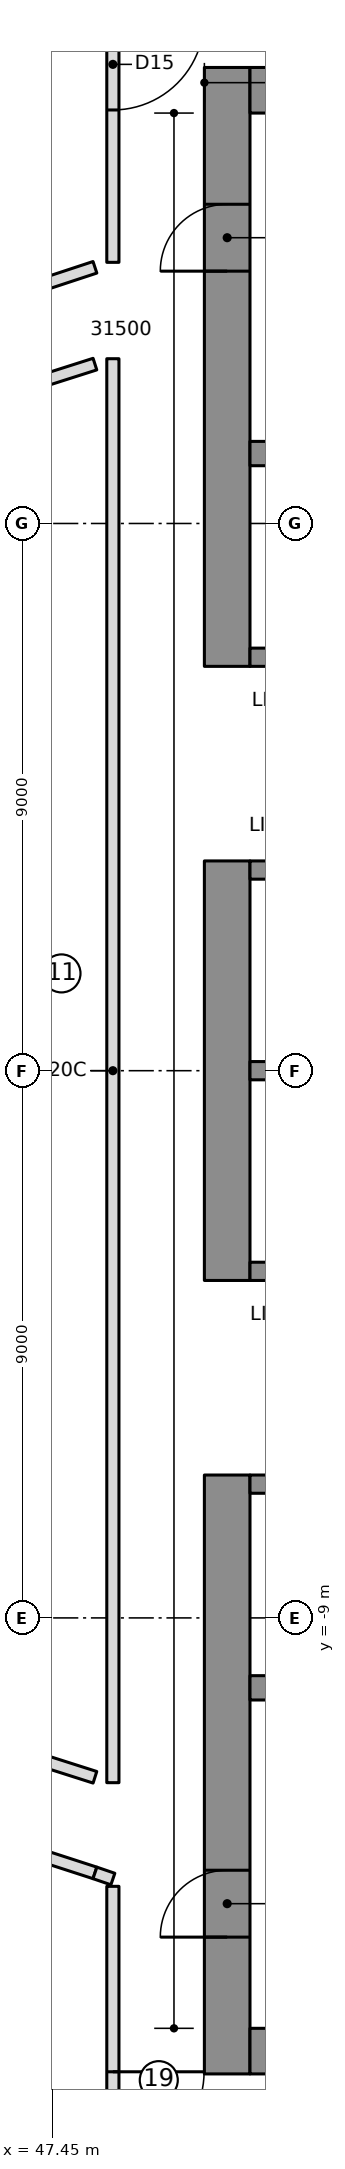
"""IFC4 building model, lengths in metres.
Left out: names, types, materials, properties, quantities, classifications, styles, units other than length and angle.
Written with IfcOpenShell. Run it as: python <this file> out.ifc"""

import sys

from ifc_helpers import new_model, si_unit, direction, frame, frame_2d, origin, place, context, subcontext, project, spatial, rectangle, extrude, element, fill, save


model = new_model("IFC4")
c1 = context("Model", 3, precision=1e-05, world=origin(), true_north=direction((0.0, 1.0)))
c2 = subcontext(c1, "Body", "Model", "MODEL_VIEW")
j1 = project(units=[si_unit("LENGTHUNIT", "METRE"), si_unit("PLANEANGLEUNIT", "RADIAN")], contexts=[c1])
p1 = place(None, origin())
s1 = spatial("IfcSite", under=j1, at=p1, CompositionType="ELEMENT")
p2 = place(p1, origin())
s2 = spatial("IfcBuilding", under=s1, at=p2, CompositionType="ELEMENT")
p3 = place(p2, frame((0.0, 0.0, 186.15)))
s3 = spatial("IfcBuildingStorey", under=s2, at=p3, CompositionType="ELEMENT", Elevation=186.15)
p4 = place(p3, frame((50.325, 6.65, 0.0), z_axis=(0.0, 0.0, 1.0), x_axis=(0.0, 1.0, 0.0)))
e1 = element("IfcWall", 1, at=p4, inside=s3, PredefinedType="SHEAR", context=c2, shape_type="SweptSolid", body=[
    extrude(rectangle(XDim=9.85, YDim=0.75, at=frame_2d((4.925, 0.0))), origin(), (0.0, 0.0, 1.0), 3.55),
])
p5 = place(p4, frame((6.5, 0.0, 0.0)))
e2 = element("IfcOpeningElement", 2, at=p5, cuts=e1, PredefinedType="OPENING", context=c2, shape_type="SweptSolid", body=[
    extrude(rectangle(XDim=1.1, YDim=2.1, at=frame_2d((0.55, 1.05))), frame((0.0, 0.385, 0.0), z_axis=(0.0, -1.0, 0.0), x_axis=(1.0, 0.0, 0.0)), (0.0, 0.0, 1.0), 0.77),
])
p6 = place(p3, frame((50.325, -3.45, 0.0), z_axis=(0.0, 0.0, 1.0), x_axis=(0.0, 1.0, 0.0)))
e3 = element("IfcWall", 3, at=p6, inside=s3, PredefinedType="SHEAR", context=c2, shape_type="SweptSolid", body=[
    extrude(rectangle(XDim=6.9, YDim=0.75, at=frame_2d((3.45, 0.0))), origin(), (0.0, 0.0, 1.0), 3.55),
])
p7 = place(p3, frame((50.325, -16.5, 0.0), z_axis=(0.0, 0.0, 1.0), x_axis=(0.0, 1.0, 0.0)))
e4 = element("IfcWall", 4, at=p7, inside=s3, PredefinedType="SHEAR", context=c2, shape_type="SweptSolid", body=[
    extrude(rectangle(XDim=9.85, YDim=0.75, at=frame_2d((4.925, 0.0))), origin(), (0.0, 0.0, 1.0), 3.55),
])
p8 = place(p7, frame((2.25, 0.0, 0.0)))
e5 = element("IfcOpeningElement", 5, at=p8, cuts=e4, PredefinedType="OPENING", context=c2, shape_type="SweptSolid", body=[
    extrude(rectangle(XDim=1.1, YDim=2.1, at=frame_2d((0.55, 1.05))), frame((0.0, 0.385, 0.0), z_axis=(0.0, -1.0, 0.0), x_axis=(1.0, 0.0, 0.0)), (0.0, 0.0, 1.0), 0.77),
])
for number, where, z_axis, x_axis in (
    (6, (50.7, 16.125, 0.0), (0.0, 0.0, 1.0), (1.0, 0.0, 0.0)),
    (7, (50.7, -16.125, 0.0), (0.0, 0.0, 1.0), (1.0, 0.0, 0.0)),
):
    element("IfcWall", number, at=place(p3, frame(where, z_axis=z_axis, x_axis=x_axis)), inside=s3, PredefinedType="SHEAR", context=c2, shape_type="SweptSolid", body=[
        extrude(rectangle(XDim=13.77, YDim=0.75, at=frame_2d((6.885, 0.0))), origin(), (0.0, 0.0, 1.0), 3.55),
    ])
p9 = place(p3, frame((50.7, 10.15, 0.0), z_axis=(0.0, 0.0, 1.0), x_axis=(1.0, 0.0, 0.0)))
e8 = element("IfcWall", 8, at=p9, inside=s3, PredefinedType="SHEAR", context=c2, shape_type="SweptSolid", body=[
    extrude(rectangle(XDim=13.02, YDim=0.4, at=frame_2d((6.51, 0.0))), origin(), (0.0, 0.0, 1.0), 3.55),
])
p10 = place(p9, frame((0.7, 0.0, 0.0)))
e9 = element("IfcOpeningElement", 9, at=p10, cuts=e8, PredefinedType="OPENING", context=c2, shape_type="SweptSolid", body=[
    extrude(rectangle(XDim=1.1, YDim=2.1, at=frame_2d((0.55, 1.05))), frame((0.0, 0.21, 0.0), z_axis=(0.0, -1.0, 0.0), x_axis=(1.0, 0.0, 0.0)), (0.0, 0.0, 1.0), 0.42),
])
p11 = place(p9, frame((3.5, 0.0, 0.0)))
e10 = element("IfcOpeningElement", 10, at=p11, cuts=e8, PredefinedType="OPENING", context=c2, shape_type="SweptSolid", body=[
    extrude(rectangle(XDim=1.1, YDim=2.1, at=frame_2d((0.55, 1.05))), frame((0.0, 0.21, 0.0), z_axis=(0.0, -1.0, 0.0), x_axis=(1.0, 0.0, 0.0)), (0.0, 0.0, 1.0), 0.42),
])
p12 = place(p3, frame((50.7, -10.15, 0.0), z_axis=(0.0, 0.0, 1.0), x_axis=(1.0, 0.0, 0.0)))
e11 = element("IfcWall", 11, at=p12, inside=s3, PredefinedType="SHEAR", context=c2, shape_type="SweptSolid", body=[
    extrude(rectangle(XDim=13.02, YDim=0.4, at=frame_2d((6.51, 0.0))), origin(), (0.0, 0.0, 1.0), 3.55),
])
p13 = place(p3, frame((50.7, 0.0, 0.0), z_axis=(0.0, 0.0, 1.0), x_axis=(1.0, 0.0, 0.0)))
e12 = element("IfcWall", 12, at=p13, inside=s3, PredefinedType="SHEAR", context=c2, shape_type="SweptSolid", body=[
    extrude(rectangle(XDim=10.9, YDim=0.3, at=frame_2d((5.45, 0.0))), origin(), (0.0, 0.0, 1.0), 3.55),
])
p14 = place(p3, frame((50.7, 3.3, 0.0), z_axis=(0.0, 0.0, 1.0), x_axis=(1.0, 0.0, 0.0)))
e13 = element("IfcWall", 13, at=p14, inside=s3, PredefinedType="SHEAR", context=c2, shape_type="SweptSolid", body=[
    extrude(rectangle(XDim=10.9, YDim=0.3, at=frame_2d((5.45, 0.0))), origin(), (0.0, 0.0, 1.0), 3.55),
])
p15 = place(p14, frame((0.7, 0.0, 0.0)))
e14 = element("IfcOpeningElement", 14, at=p15, cuts=e13, PredefinedType="OPENING", context=c2, shape_type="SweptSolid", body=[
    extrude(rectangle(XDim=1.1, YDim=2.1, at=frame_2d((0.55, 1.05))), frame((0.0, 0.16, 0.0), z_axis=(0.0, -1.0, 0.0), x_axis=(1.0, 0.0, 0.0)), (0.0, 0.0, 1.0), 0.32),
])
p16 = place(p14, frame((3.5, 0.0, 0.0)))
e15 = element("IfcOpeningElement", 15, at=p16, cuts=e13, PredefinedType="OPENING", context=c2, shape_type="SweptSolid", body=[
    extrude(rectangle(XDim=1.1, YDim=2.1, at=frame_2d((0.55, 1.05))), frame((0.0, 0.16, 0.0), z_axis=(0.0, -1.0, 0.0), x_axis=(1.0, 0.0, 0.0)), (0.0, 0.0, 1.0), 0.32),
])
p17 = place(p14, frame((6.3, 0.0, 0.0)))
e16 = element("IfcOpeningElement", 16, at=p17, cuts=e13, PredefinedType="OPENING", context=c2, shape_type="SweptSolid", body=[
    extrude(rectangle(XDim=1.1, YDim=2.1, at=frame_2d((0.55, 1.05))), frame((0.0, 0.16, 0.0), z_axis=(0.0, -1.0, 0.0), x_axis=(1.0, 0.0, 0.0)), (0.0, 0.0, 1.0), 0.32),
])
p18 = place(p14, frame((9.1, 0.0, 0.0)))
e17 = element("IfcOpeningElement", 17, at=p18, cuts=e13, PredefinedType="OPENING", context=c2, shape_type="SweptSolid", body=[
    extrude(rectangle(XDim=1.1, YDim=2.1, at=frame_2d((0.55, 1.05))), frame((0.0, 0.16, 0.0), z_axis=(0.0, -1.0, 0.0), x_axis=(1.0, 0.0, 0.0)), (0.0, 0.0, 1.0), 0.32),
])
p19 = place(p3, frame((50.7, 6.8, 0.0), z_axis=(0.0, 0.0, 1.0), x_axis=(1.0, 0.0, 0.0)))
e18 = element("IfcWall", 18, at=p19, inside=s3, PredefinedType="SHEAR", context=c2, shape_type="SweptSolid", body=[
    extrude(rectangle(XDim=10.9, YDim=0.3, at=frame_2d((5.45, 0.0))), origin(), (0.0, 0.0, 1.0), 3.55),
])
p20 = place(p19, frame((6.4, 0.0, 0.0)))
e19 = element("IfcOpeningElement", 19, at=p20, cuts=e18, PredefinedType="OPENING", context=c2, shape_type="SweptSolid", body=[
    extrude(rectangle(XDim=0.9, YDim=2.1, at=frame_2d((0.45, 1.05))), frame((0.0, 0.16, 0.0), z_axis=(0.0, -1.0, 0.0), x_axis=(1.0, 0.0, 0.0)), (0.0, 0.0, 1.0), 0.32),
])
p21 = place(p19, frame((9.2, 0.0, 0.0)))
e20 = element("IfcOpeningElement", 20, at=p21, cuts=e18, PredefinedType="OPENING", context=c2, shape_type="SweptSolid", body=[
    extrude(rectangle(XDim=0.9, YDim=2.1, at=frame_2d((0.45, 1.05))), frame((0.0, 0.16, 0.0), z_axis=(0.0, -1.0, 0.0), x_axis=(1.0, 0.0, 0.0)), (0.0, 0.0, 1.0), 0.32),
])
p22 = place(p3, frame((50.7, -3.3, 0.0), z_axis=(0.0, 0.0, 1.0), x_axis=(1.0, 0.0, 0.0)))
e21 = element("IfcWall", 21, at=p22, inside=s3, PredefinedType="SHEAR", context=c2, shape_type="SweptSolid", body=[
    extrude(rectangle(XDim=10.9, YDim=0.3, at=frame_2d((5.45, 0.0))), origin(), (0.0, 0.0, 1.0), 3.55),
])
p23 = place(p22, frame((9.1, 0.0, 0.0)))
e22 = element("IfcOpeningElement", 22, at=p23, cuts=e21, PredefinedType="OPENING", context=c2, shape_type="SweptSolid", body=[
    extrude(rectangle(XDim=1.1, YDim=2.1, at=frame_2d((0.55, 1.05))), frame((0.0, 0.16, 0.0), z_axis=(0.0, -1.0, 0.0), x_axis=(1.0, 0.0, 0.0)), (0.0, 0.0, 1.0), 0.32),
])
p24 = place(p3, frame((50.7, -6.8, 0.0), z_axis=(0.0, 0.0, 1.0), x_axis=(1.0, 0.0, 0.0)))
e23 = element("IfcWall", 23, at=p24, inside=s3, PredefinedType="SHEAR", context=c2, shape_type="SweptSolid", body=[
    extrude(rectangle(XDim=10.9, YDim=0.3, at=frame_2d((5.45, 0.0))), origin(), (0.0, 0.0, 1.0), 3.55),
])
p25 = place(p24, frame((6.3, 0.0, 0.0)))
e24 = element("IfcOpeningElement", 24, at=p25, cuts=e23, PredefinedType="OPENING", context=c2, shape_type="SweptSolid", body=[
    extrude(rectangle(XDim=1.1, YDim=2.1, at=frame_2d((0.55, 1.05))), frame((0.0, 0.16, 0.0), z_axis=(0.0, -1.0, 0.0), x_axis=(1.0, 0.0, 0.0)), (0.0, 0.0, 1.0), 0.32),
])
p26 = place(p24, frame((9.1, 0.0, 0.0)))
e25 = element("IfcOpeningElement", 25, at=p26, cuts=e23, PredefinedType="OPENING", context=c2, shape_type="SweptSolid", body=[
    extrude(rectangle(XDim=1.1, YDim=2.1, at=frame_2d((0.55, 1.05))), frame((0.0, 0.16, 0.0), z_axis=(0.0, -1.0, 0.0), x_axis=(1.0, 0.0, 0.0)), (0.0, 0.0, 1.0), 0.32),
])
p27 = place(p24, frame((0.8, 0.0, 0.0)))
e26 = element("IfcOpeningElement", 26, at=p27, cuts=e23, PredefinedType="OPENING", context=c2, shape_type="SweptSolid", body=[
    extrude(rectangle(XDim=0.9, YDim=2.1, at=frame_2d((0.45, 1.05))), frame((0.0, 0.16, 0.0), z_axis=(0.0, -1.0, 0.0), x_axis=(1.0, 0.0, 0.0)), (0.0, 0.0, 1.0), 0.32),
])
p28 = place(p24, frame((3.6, 0.0, 0.0)))
e27 = element("IfcOpeningElement", 27, at=p28, cuts=e23, PredefinedType="OPENING", context=c2, shape_type="SweptSolid", body=[
    extrude(rectangle(XDim=0.9, YDim=2.1, at=frame_2d((0.45, 1.05))), frame((0.0, 0.16, 0.0), z_axis=(0.0, -1.0, 0.0), x_axis=(1.0, 0.0, 0.0)), (0.0, 0.0, 1.0), 0.32),
])
p29 = place(p3, frame((48.15, 13.213, 0.0), z_axis=(0.0, 0.0, 1.0), x_axis=(-0.949729856115, -0.313070599711, 0.0)))
e28 = element("IfcWall", 28, at=p29, inside=s3, PredefinedType="PARTITIONING", context=c2, shape_type="SweptSolid", body=[
    extrude(rectangle(XDim=3.853, YDim=0.2, at=frame_2d((1.927, 0.0))), origin(), (0.0, 0.0, 1.0), 3.25),
])
p30 = place(p3, frame((44.49, -12.007, 0.0), z_axis=(0.0, 0.0, 1.0), x_axis=(0.951228355446, -0.308487626648, 0.0)))
e29 = element("IfcWall", 29, at=p30, inside=s3, PredefinedType="PARTITIONING", context=c2, shape_type="SweptSolid", body=[
    extrude(rectangle(XDim=3.847, YDim=0.2, at=frame_2d((1.924, 0.0))), origin(), (0.0, 0.0, 1.0), 3.25),
])
for number, where, z_axis, x_axis in (
    (30, (46.881, 11.217, 0.0), (0.0, 0.0, 1.0), (0.953, 0.304, 0.0)),
    (31, (48.15, -11.621, 0.0), (0.0, 0.0, 1.0), (-0.953, 0.304, 0.0)),
):
    element("IfcWall", number, at=place(p3, frame(where, z_axis=z_axis, x_axis=x_axis)), inside=s3, PredefinedType="PARTITIONING", context=c2, shape_type="SweptSolid", body=[
        extrude(rectangle(XDim=1.332, YDim=0.2, at=frame_2d((0.666, 0.0))), origin(), (0.0, 0.0, 1.0), 3.25),
    ])
p31 = place(p3, frame((48.445, 11.71, 0.0), z_axis=(0.0, 0.0, 1.0), x_axis=(0.0, -1.0, 0.0)))
e32 = element("IfcWall", 32, at=p31, inside=s3, PredefinedType="PARTITIONING", context=c2, shape_type="SweptSolid", body=[
    extrude(rectangle(XDim=23.42, YDim=0.2, at=frame_2d((11.71, 0.0))), origin(), (0.0, 0.0, 1.0), 3.25),
])
p32 = place(p3, frame((48.445, 20.351, 0.0), z_axis=(0.0, 0.0, 1.0), x_axis=(0.0, -1.0, 0.0)))
e33 = element("IfcWall", 33, at=p32, inside=s3, PredefinedType="PARTITIONING", context=c2, shape_type="SweptSolid", body=[
    extrude(rectangle(XDim=7.056, YDim=0.2, at=frame_2d((3.528, 0.0))), origin(), (0.0, 0.0, 1.0), 3.25),
])
p33 = place(p32, frame((3.05, 0.0, 0.0)))
e34 = element("IfcOpeningElement", 34, at=p33, cuts=e33, PredefinedType="OPENING", context=c2, shape_type="SweptSolid", body=[
    extrude(rectangle(XDim=1.5, YDim=2.1, at=frame_2d((0.75, 1.05))), frame((0.0, 0.11, 0.0), z_axis=(0.0, -1.0, 0.0), x_axis=(1.0, 0.0, 0.0)), (0.0, 0.0, 1.0), 0.22),
])
p34 = place(p3, frame((48.15, -13.194, 0.0), z_axis=(0.0, 0.0, 1.0), x_axis=(0.946069343286, -0.323964191994, 0.0)))
e35 = element("IfcWall", 35, at=p34, inside=s3, PredefinedType="PARTITIONING", context=c2, shape_type="SweptSolid", body=[
    extrude(rectangle(XDim=0.312, YDim=0.2, at=frame_2d((0.156, 0.0))), origin(), (0.0, 0.0, 1.0), 3.25),
])
p35 = place(p3, frame((48.445, -13.415, 0.0), z_axis=(0.0, 0.0, 1.0), x_axis=(0.0, -1.0, 0.0)))
e36 = element("IfcWall", 36, at=p35, inside=s3, PredefinedType="PARTITIONING", context=c2, shape_type="SweptSolid", body=[
    extrude(rectangle(XDim=6.936, YDim=0.2, at=frame_2d((3.468, 0.0))), origin(), (0.0, 0.0, 1.0), 3.25),
])
p36 = place(p35, frame((3.05, 0.0, 0.0)))
e37 = element("IfcOpeningElement", 37, at=p36, cuts=e36, PredefinedType="OPENING", context=c2, shape_type="SweptSolid", body=[
    extrude(rectangle(XDim=1.5, YDim=2.1, at=frame_2d((0.75, 1.05))), frame((0.0, 0.11, 0.0), z_axis=(0.0, -1.0, 0.0), x_axis=(1.0, 0.0, 0.0)), (0.0, 0.0, 1.0), 0.22),
])
p37 = place(p33, origin())
e38 = element("IfcDoor", 38, at=p37, inside=s3, OperationType="DOUBLE_DOOR_SINGLE_SWING", PredefinedType="DOOR", context=c2, shape_type="SweptSolid", body=[
    extrude(rectangle(XDim=1.5, YDim=2.1, at=frame_2d((0.75, 1.05))), frame((0.0, 0.025, 0.0), z_axis=(0.0, -1.0, 0.0), x_axis=(1.0, 0.0, 0.0)), (0.0, 0.0, 1.0), 0.05),
])
fill(e34, e38)
p38 = place(p36, origin())
e39 = element("IfcDoor", 39, at=p38, inside=s3, OperationType="DOUBLE_DOOR_SINGLE_SWING", PredefinedType="DOOR", context=c2, shape_type="SweptSolid", body=[
    extrude(rectangle(XDim=1.5, YDim=2.1, at=frame_2d((0.75, 1.05))), frame((0.0, 0.025, 0.0), z_axis=(0.0, -1.0, 0.0), x_axis=(1.0, 0.0, 0.0)), (0.0, 0.0, 1.0), 0.05),
])
fill(e37, e39)
p39 = place(p5, origin())
e40 = element("IfcDoor", 40, at=p39, inside=s3, OperationType="SINGLE_SWING_RIGHT", PredefinedType="DOOR", context=c2, shape_type="SweptSolid", body=[
    extrude(rectangle(XDim=1.1, YDim=2.1, at=frame_2d((0.55, 1.05))), frame((0.0, 0.025, 0.0), z_axis=(0.0, -1.0, 0.0), x_axis=(1.0, 0.0, 0.0)), (0.0, 0.0, 1.0), 0.05),
])
fill(e2, e40)
p40 = place(p8, origin())
e41 = element("IfcDoor", 41, at=p40, inside=s3, OperationType="SINGLE_SWING_RIGHT", PredefinedType="DOOR", context=c2, shape_type="SweptSolid", body=[
    extrude(rectangle(XDim=1.1, YDim=2.1, at=frame_2d((0.55, 1.05))), frame((0.0, 0.025, 0.0), z_axis=(0.0, -1.0, 0.0), x_axis=(1.0, 0.0, 0.0)), (0.0, 0.0, 1.0), 0.05),
])
fill(e5, e41)
save(model, sys.argv[1])
